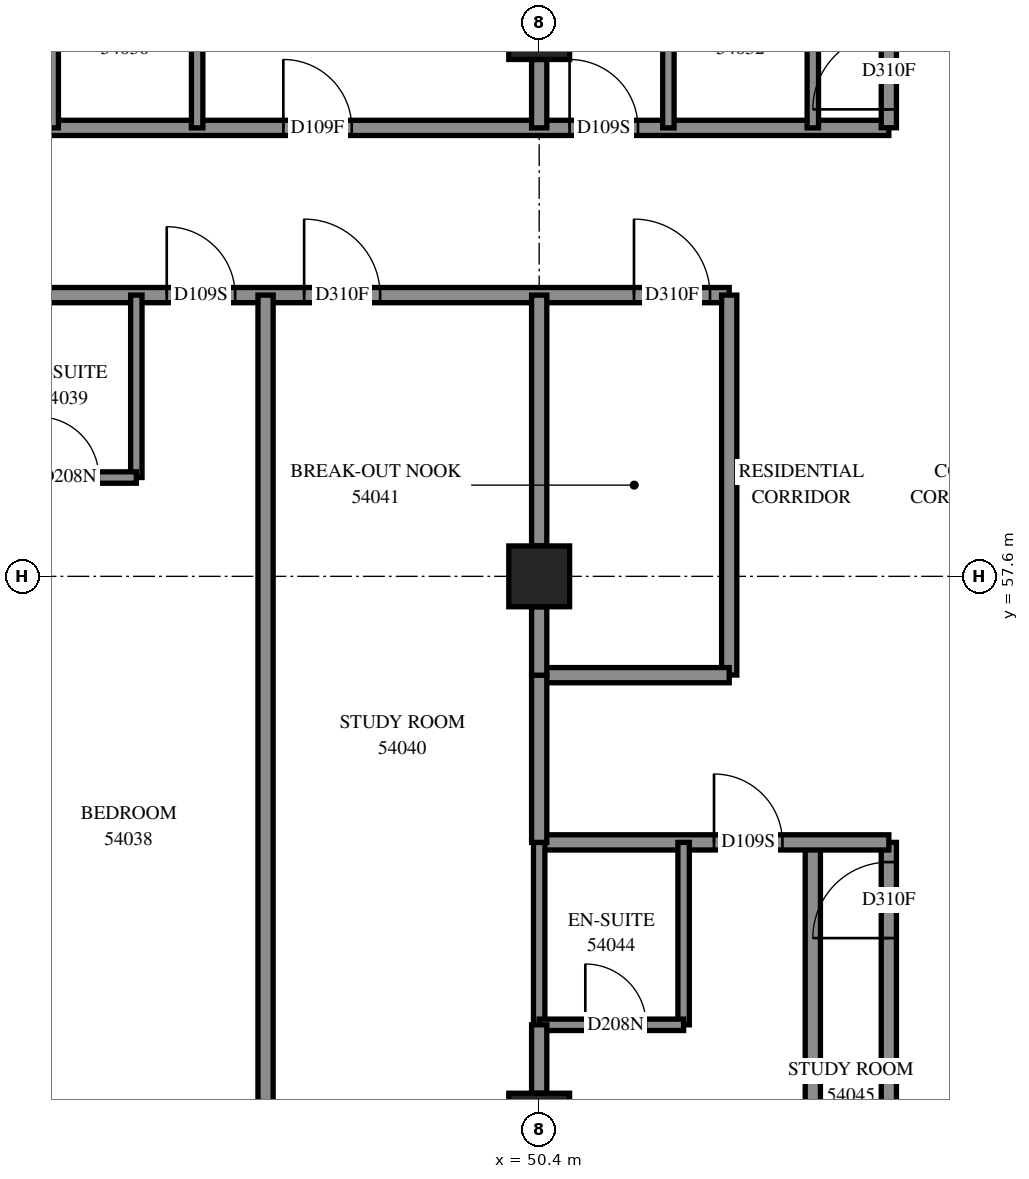
"""IFC4 building model, lengths in metres.
Left out: names, types, materials, properties, quantities, classifications, styles, units other than length and angle.
Written with IfcOpenShell. Run it as: python <this file> out.ifc"""

import sys

from ifc_helpers import new_model, si_unit, direction, frame, frame_2d, origin, origin_2d, place, context, subcontext, project, spatial, rectangle, extrude, element, fill, save


model = new_model("IFC4")
c1 = context("Model", 3, precision=1e-05, world=origin(), true_north=direction((0.0, 1.0)))
c2 = subcontext(c1, "Body", "Model", "MODEL_VIEW")
j1 = project(units=[si_unit("LENGTHUNIT", "METRE"), si_unit("PLANEANGLEUNIT", "RADIAN")], contexts=[c1])
p1 = place(None, origin())
s1 = spatial("IfcSite", under=j1, at=p1, CompositionType="ELEMENT")
p2 = place(p1, origin())
s2 = spatial("IfcBuilding", under=s1, at=p2, CompositionType="ELEMENT")
p3 = place(p2, frame((0.0, 0.0, 199.8)))
s3 = spatial("IfcBuildingStorey", under=s2, at=p3, CompositionType="ELEMENT", Elevation=199.8)
for number, where, z_axis, x_axis in (
    (1, (50.4, 50.4, 0.0), (0.0, 0.0, 1.0), (1.0, 0.0, 0.0)),
    (2, (50.4, 57.6, 0.0), (0.0, 0.0, 1.0), (1.0, 0.0, 0.0)),
    (3, (50.4, 64.8, 0.0), (0.0, 0.0, 1.0), (1.0, 0.0, 0.0)),
):
    element("IfcColumn", number, at=place(p3, frame(where, z_axis=z_axis, x_axis=x_axis)), inside=s3, PredefinedType="COLUMN", context=c2, shape_type="SweptSolid", body=[
        extrude(rectangle(XDim=0.8, YDim=0.8, at=origin_2d()), origin(), (0.0, 0.0, 1.0), 3.1),
    ])
p4 = place(p3, frame((36.0, 61.3, 0.0), z_axis=(0.0, 0.0, 1.0), x_axis=(1.0, 0.0, 0.0)))
e4 = element("IfcWall", 4, at=p4, inside=s3, PredefinedType="PARTITIONING", context=c2, shape_type="SweptSolid", body=[
    extrude(rectangle(XDim=16.9, YDim=0.2, at=frame_2d((8.45, 0.0))), origin(), (0.0, 0.0, 1.0), 3.1),
])
p5 = place(p4, frame((2.3, 0.0, 0.0)))
e5 = element("IfcOpeningElement", 5, at=p5, cuts=e4, PredefinedType="OPENING", context=c2, shape_type="SweptSolid", body=[
    extrude(rectangle(XDim=0.9, YDim=2.1, at=frame_2d((0.45, 1.05))), frame((0.0, 0.11, 0.0), z_axis=(0.0, -1.0, 0.0), x_axis=(1.0, 0.0, 0.0)), (0.0, 0.0, 1.0), 0.22),
])
p6 = place(p4, frame((4.107, 0.0, 0.0)))
e6 = element("IfcOpeningElement", 6, at=p6, cuts=e4, PredefinedType="OPENING", context=c2, shape_type="SweptSolid", body=[
    extrude(rectangle(XDim=1.0, YDim=2.1, at=frame_2d((0.5, 1.05))), frame((0.0, 0.11, 0.0), z_axis=(0.0, -1.0, 0.0), x_axis=(1.0, 0.0, 0.0)), (0.0, 0.0, 1.0), 0.22),
])
p7 = place(p4, frame((9.5, 0.0, 0.0)))
e7 = element("IfcOpeningElement", 7, at=p7, cuts=e4, PredefinedType="OPENING", context=c2, shape_type="SweptSolid", body=[
    extrude(rectangle(XDim=0.9, YDim=2.1, at=frame_2d((0.45, 1.05))), frame((0.0, 0.11, 0.0), z_axis=(0.0, -1.0, 0.0), x_axis=(1.0, 0.0, 0.0)), (0.0, 0.0, 1.0), 0.22),
])
p8 = place(p4, frame((11.307, 0.0, 0.0)))
e8 = element("IfcOpeningElement", 8, at=p8, cuts=e4, PredefinedType="OPENING", context=c2, shape_type="SweptSolid", body=[
    extrude(rectangle(XDim=1.0, YDim=2.1, at=frame_2d((0.5, 1.05))), frame((0.0, 0.11, 0.0), z_axis=(0.0, -1.0, 0.0), x_axis=(1.0, 0.0, 0.0)), (0.0, 0.0, 1.0), 0.22),
])
p9 = place(p4, frame((15.647, 0.0, 0.0)))
e9 = element("IfcOpeningElement", 9, at=p9, cuts=e4, PredefinedType="OPENING", context=c2, shape_type="SweptSolid", body=[
    extrude(rectangle(XDim=1.0, YDim=2.1, at=frame_2d((0.5, 1.05))), frame((0.0, 0.11, 0.0), z_axis=(0.0, -1.0, 0.0), x_axis=(1.0, 0.0, 0.0)), (0.0, 0.0, 1.0), 0.22),
])
p10 = place(p3, frame((40.702, 63.5, 0.0), z_axis=(0.0, 0.0, 1.0), x_axis=(1.0, 0.0, 0.0)))
e10 = element("IfcWall", 10, at=p10, inside=s3, PredefinedType="PARTITIONING", context=c2, shape_type="SweptSolid", body=[
    extrude(rectangle(XDim=14.298, YDim=0.2, at=frame_2d((7.149, 0.0))), origin(), (0.0, 0.0, 1.0), 3.1),
])
p11 = place(p10, frame((6.332, 0.0, 0.0)))
e11 = element("IfcOpeningElement", 11, at=p11, cuts=e10, PredefinedType="OPENING", context=c2, shape_type="SweptSolid", body=[
    extrude(rectangle(XDim=0.9, YDim=2.1, at=frame_2d((0.45, 1.05))), frame((0.0, 0.11, 0.0), z_axis=(0.0, -1.0, 0.0), x_axis=(1.0, 0.0, 0.0)), (0.0, 0.0, 1.0), 0.22),
])
p12 = place(p10, frame((10.098, 0.0, 0.0)))
e12 = element("IfcOpeningElement", 12, at=p12, cuts=e10, PredefinedType="OPENING", context=c2, shape_type="SweptSolid", body=[
    extrude(rectangle(XDim=0.9, YDim=2.1, at=frame_2d((0.45, 1.05))), frame((0.0, 0.11, 0.0), z_axis=(0.0, -1.0, 0.0), x_axis=(1.0, 0.0, 0.0)), (0.0, 0.0, 1.0), 0.22),
])
p13 = place(p3, frame((54.0, 42.372, 0.0), z_axis=(0.0, 0.0, 1.0), x_axis=(0.0, 1.0, 0.0)))
e13 = element("IfcWall", 13, at=p13, inside=s3, PredefinedType="PARTITIONING", context=c2, shape_type="SweptSolid", body=[
    extrude(rectangle(XDim=11.728, YDim=0.2, at=frame_2d((5.864, 0.0))), origin(), (0.0, 0.0, 1.0), 3.1),
])
p14 = place(p3, frame((46.8, 49.7, 0.0), z_axis=(0.0, 0.0, 1.0), x_axis=(0.0, 1.0, 0.0)))
e14 = element("IfcWall", 14, at=p14, inside=s3, PredefinedType="PARTITIONING", context=c2, shape_type="SweptSolid", body=[
    extrude(rectangle(XDim=11.6, YDim=0.2, at=frame_2d((5.8, 0.0))), origin(), (0.0, 0.0, 1.0), 3.1),
])
p15 = place(p3, frame((55.0, 47.8, 0.0), z_axis=(0.0, 0.0, 1.0), x_axis=(0.0, 1.0, 0.0)))
e15 = element("IfcWall", 15, at=p15, inside=s3, PredefinedType="PARTITIONING", context=c2, shape_type="SweptSolid", body=[
    extrude(rectangle(XDim=6.3, YDim=0.2, at=frame_2d((3.15, 0.0))), origin(), (0.0, 0.0, 1.0), 3.1),
])
p16 = place(p15, frame((5.041, 0.0, 0.0)))
e16 = element("IfcOpeningElement", 16, at=p16, cuts=e15, PredefinedType="OPENING", context=c2, shape_type="SweptSolid", body=[
    extrude(rectangle(XDim=1.0, YDim=2.1, at=frame_2d((0.5, 1.05))), frame((0.0, 0.11, 0.0), z_axis=(0.0, -1.0, 0.0), x_axis=(1.0, 0.0, 0.0)), (0.0, 0.0, 1.0), 0.22),
])
p17 = place(p3, frame((52.9, 56.302, 0.0), z_axis=(0.0, 0.0, 1.0), x_axis=(0.0, 1.0, 0.0)))
e17 = element("IfcWall", 17, at=p17, inside=s3, PredefinedType="PARTITIONING", context=c2, shape_type="SweptSolid", body=[
    extrude(rectangle(XDim=4.998, YDim=0.2, at=frame_2d((2.499, 0.0))), origin(), (0.0, 0.0, 1.0), 3.1),
])
p18 = place(p3, frame((50.4, 54.1, 0.0), z_axis=(0.0, 0.0, 1.0), x_axis=(1.0, 0.0, 0.0)))
e18 = element("IfcWall", 18, at=p18, inside=s3, PredefinedType="PARTITIONING", context=c2, shape_type="SweptSolid", body=[
    extrude(rectangle(XDim=4.6, YDim=0.2, at=frame_2d((2.3, 0.0))), origin(), (0.0, 0.0, 1.0), 3.1),
])
p19 = place(p18, frame((2.3, 0.0, 0.0)))
e19 = element("IfcOpeningElement", 19, at=p19, cuts=e18, PredefinedType="OPENING", context=c2, shape_type="SweptSolid", body=[
    extrude(rectangle(XDim=0.9, YDim=2.1, at=frame_2d((0.45, 1.05))), frame((0.0, 0.11, 0.0), z_axis=(0.0, -1.0, 0.0), x_axis=(1.0, 0.0, 0.0)), (0.0, 0.0, 1.0), 0.22),
])
p20 = place(p3, frame((55.0, 63.502, 0.0), z_axis=(0.0, 0.0, 1.0), x_axis=(0.0, 1.0, 0.0)))
e20 = element("IfcWall", 20, at=p20, inside=s3, PredefinedType="PARTITIONING", context=c2, shape_type="SweptSolid", body=[
    extrude(rectangle(XDim=3.898, YDim=0.2, at=frame_2d((1.949, 0.0))), origin(), (0.0, 0.0, 1.0), 3.1),
])
p21 = place(p20, frame((0.242, 0.0, 0.0)))
e21 = element("IfcOpeningElement", 21, at=p21, cuts=e20, PredefinedType="OPENING", context=c2, shape_type="SweptSolid", body=[
    extrude(rectangle(XDim=1.0, YDim=2.1, at=frame_2d((0.5, 1.05))), frame((0.0, 0.11, 0.0), z_axis=(0.0, -1.0, 0.0), x_axis=(1.0, 0.0, 0.0)), (0.0, 0.0, 1.0), 0.22),
])
p22 = place(p3, frame((50.4, 58.0, 0.0), z_axis=(0.0, 0.0, 1.0), x_axis=(0.0, 1.0, 0.0)))
e22 = element("IfcWall", 22, at=p22, inside=s3, PredefinedType="PARTITIONING", context=c2, shape_type="SweptSolid", body=[
    extrude(rectangle(XDim=3.3, YDim=0.2, at=frame_2d((1.65, 0.0))), origin(), (0.0, 0.0, 1.0), 3.1),
])
p23 = place(p3, frame((50.4, 56.3, 0.0), z_axis=(0.0, 0.0, 1.0), x_axis=(1.0, 0.0, 0.0)))
e23 = element("IfcWall", 23, at=p23, inside=s3, PredefinedType="PARTITIONING", context=c2, shape_type="SweptSolid", body=[
    extrude(rectangle(XDim=2.5, YDim=0.2, at=frame_2d((1.25, 0.0))), origin(), (0.0, 0.0, 1.0), 3.1),
])
for number, where, z_axis, x_axis in (
    (24, (44.0, 63.5, 0.0), (0.0, 0.0, 1.0), (0.0, 1.0, 0.0)),
    (25, (45.9, 63.5, 0.0), (0.0, 0.0, 1.0), (0.0, 1.0, 0.0)),
    (26, (52.1, 63.5, 0.0), (0.0, 0.0, 1.0), (0.0, 1.0, 0.0)),
    (27, (54.0, 63.5, 0.0), (0.0, 0.0, 1.0), (0.0, 1.0, 0.0)),
    (28, (45.1, 58.9, 0.0), (0.0, 0.0, 1.0), (0.0, 1.0, 0.0)),
    (29, (52.3, 51.7, 0.0), (0.0, 0.0, 1.0), (0.0, 1.0, 0.0)),
    (30, (50.4, 51.7, 0.0), (0.0, 0.0, 1.0), (0.0, 1.0, 0.0)),
):
    element("IfcWall", number, at=place(p3, frame(where, z_axis=z_axis, x_axis=x_axis)), inside=s3, PredefinedType="PARTITIONING", context=c2, shape_type="SweptSolid", body=[
        extrude(rectangle(XDim=2.4, YDim=0.15, at=frame_2d((1.2, 0.0))), origin(), (0.0, 0.0, 1.0), 3.1),
    ])
p24 = place(p3, frame((50.4, 54.1, 0.0), z_axis=(0.0, 0.0, 1.0), x_axis=(0.0, 1.0, 0.0)))
e31 = element("IfcWall", 31, at=p24, inside=s3, PredefinedType="PARTITIONING", context=c2, shape_type="SweptSolid", body=[
    extrude(rectangle(XDim=2.2, YDim=0.2, at=frame_2d((1.1, 0.0))), origin(), (0.0, 0.0, 1.0), 3.1),
])
p25 = place(p3, frame((43.2, 58.9, 0.0), z_axis=(0.0, 0.0, 1.0), x_axis=(1.0, 0.0, 0.0)))
e32 = element("IfcWall", 32, at=p25, inside=s3, PredefinedType="PARTITIONING", context=c2, shape_type="SweptSolid", body=[
    extrude(rectangle(XDim=1.9, YDim=0.15, at=frame_2d((0.95, 0.0))), origin(), (0.0, 0.0, 1.0), 3.1),
])
p26 = place(p25, frame((0.607, 0.0, 0.0)))
e33 = element("IfcOpeningElement", 33, at=p26, cuts=e32, PredefinedType="OPENING", context=c2, shape_type="SweptSolid", body=[
    extrude(rectangle(XDim=0.8, YDim=2.1, at=frame_2d((0.4, 1.05))), frame((0.0, 0.085, 0.0), z_axis=(0.0, -1.0, 0.0), x_axis=(1.0, 0.0, 0.0)), (0.0, 0.0, 1.0), 0.17),
])
p27 = place(p3, frame((50.4, 51.7, 0.0), z_axis=(0.0, 0.0, 1.0), x_axis=(1.0, 0.0, 0.0)))
e34 = element("IfcWall", 34, at=p27, inside=s3, PredefinedType="PARTITIONING", context=c2, shape_type="SweptSolid", body=[
    extrude(rectangle(XDim=1.9, YDim=0.15, at=frame_2d((0.95, 0.0))), origin(), (0.0, 0.0, 1.0), 3.1),
])
p28 = place(p27, frame((0.607, 0.0, 0.0)))
e35 = element("IfcOpeningElement", 35, at=p28, cuts=e34, PredefinedType="OPENING", context=c2, shape_type="SweptSolid", body=[
    extrude(rectangle(XDim=0.8, YDim=2.1, at=frame_2d((0.4, 1.05))), frame((0.0, 0.085, 0.0), z_axis=(0.0, -1.0, 0.0), x_axis=(1.0, 0.0, 0.0)), (0.0, 0.0, 1.0), 0.17),
])
for number, where, z_axis, x_axis in (
    (36, (50.4, 50.8, 0.0), (0.0, 0.0, 1.0), (0.0, 1.0, 0.0)),
    (37, (50.4, 56.3, 0.0), (0.0, 0.0, 1.0), (0.0, 1.0, 0.0)),
    (38, (50.4, 63.5, 0.0), (0.0, 0.0, 1.0), (0.0, 1.0, 0.0)),
):
    element("IfcWall", number, at=place(p3, frame(where, z_axis=z_axis, x_axis=x_axis)), inside=s3, PredefinedType="PARTITIONING", context=c2, shape_type="SweptSolid", body=[
        extrude(rectangle(XDim=0.9, YDim=0.2, at=frame_2d((0.45, 0.0))), origin(), (0.0, 0.0, 1.0), 3.1),
    ])
p29 = place(p11, origin())
e39 = element("IfcDoor", 39, at=p29, inside=s3, OperationType="SINGLE_SWING_RIGHT", PredefinedType="DOOR", context=c2, shape_type="SweptSolid", body=[
    extrude(rectangle(XDim=0.9, YDim=2.1, at=frame_2d((0.45, 1.05))), frame((0.0, 0.025, 0.0), z_axis=(0.0, -1.0, 0.0), x_axis=(1.0, 0.0, 0.0)), (0.0, 0.0, 1.0), 0.05),
])
fill(e11, e39)
p30 = place(p12, origin())
e40 = element("IfcDoor", 40, at=p30, inside=s3, OperationType="SINGLE_SWING_RIGHT", PredefinedType="DOOR", context=c2, shape_type="SweptSolid", body=[
    extrude(rectangle(XDim=0.9, YDim=2.1, at=frame_2d((0.45, 1.05))), frame((0.0, 0.025, 0.0), z_axis=(0.0, -1.0, 0.0), x_axis=(1.0, 0.0, 0.0)), (0.0, 0.0, 1.0), 0.05),
])
fill(e12, e40)
p31 = place(p21, origin())
e41 = element("IfcDoor", 41, at=p31, inside=s3, OperationType="SINGLE_SWING_LEFT", PredefinedType="DOOR", context=c2, shape_type="SweptSolid", body=[
    extrude(rectangle(XDim=1.0, YDim=2.1, at=frame_2d((0.5, 1.05))), frame((0.0, 0.025, 0.0), z_axis=(0.0, -1.0, 0.0), x_axis=(1.0, 0.0, 0.0)), (0.0, 0.0, 1.0), 0.05),
])
fill(e21, e41)
p32 = place(p7, origin())
e42 = element("IfcDoor", 42, at=p32, inside=s3, OperationType="SINGLE_SWING_LEFT", PredefinedType="DOOR", context=c2, shape_type="SweptSolid", body=[
    extrude(rectangle(XDim=0.9, YDim=2.1, at=frame_2d((0.45, 1.05))), frame((0.0, 0.025, 0.0), z_axis=(0.0, -1.0, 0.0), x_axis=(1.0, 0.0, 0.0)), (0.0, 0.0, 1.0), 0.05),
])
fill(e7, e42)
p33 = place(p26, origin())
e43 = element("IfcDoor", 43, at=p33, inside=s3, OperationType="SINGLE_SWING_RIGHT", PredefinedType="DOOR", context=c2, shape_type="SweptSolid", body=[
    extrude(rectangle(XDim=0.8, YDim=2.1, at=frame_2d((0.4, 1.05))), frame((0.0, 0.025, 0.0), z_axis=(0.0, -1.0, 0.0), x_axis=(1.0, 0.0, 0.0)), (0.0, 0.0, 1.0), 0.05),
])
fill(e33, e43)
p34 = place(p8, origin())
e44 = element("IfcDoor", 44, at=p34, inside=s3, OperationType="SINGLE_SWING_RIGHT", PredefinedType="DOOR", context=c2, shape_type="SweptSolid", body=[
    extrude(rectangle(XDim=1.0, YDim=2.1, at=frame_2d((0.5, 1.05))), frame((0.0, 0.025, 0.0), z_axis=(0.0, -1.0, 0.0), x_axis=(1.0, 0.0, 0.0)), (0.0, 0.0, 1.0), 0.05),
])
fill(e8, e44)
p35 = place(p9, origin())
e45 = element("IfcDoor", 45, at=p35, inside=s3, OperationType="SINGLE_SWING_LEFT", PredefinedType="DOOR", context=c2, shape_type="SweptSolid", body=[
    extrude(rectangle(XDim=1.0, YDim=2.1, at=frame_2d((0.5, 1.05))), frame((0.0, 0.025, 0.0), z_axis=(0.0, -1.0, 0.0), x_axis=(1.0, 0.0, 0.0)), (0.0, 0.0, 1.0), 0.05),
])
fill(e9, e45)
p36 = place(p19, origin())
e46 = element("IfcDoor", 46, at=p36, inside=s3, OperationType="SINGLE_SWING_LEFT", PredefinedType="DOOR", context=c2, shape_type="SweptSolid", body=[
    extrude(rectangle(XDim=0.9, YDim=2.1, at=frame_2d((0.45, 1.05))), frame((0.0, 0.025, 0.0), z_axis=(0.0, -1.0, 0.0), x_axis=(1.0, 0.0, 0.0)), (0.0, 0.0, 1.0), 0.05),
])
fill(e19, e46)
p37 = place(p28, origin())
e47 = element("IfcDoor", 47, at=p37, inside=s3, OperationType="SINGLE_SWING_RIGHT", PredefinedType="DOOR", context=c2, shape_type="SweptSolid", body=[
    extrude(rectangle(XDim=0.8, YDim=2.1, at=frame_2d((0.4, 1.05))), frame((0.0, 0.025, 0.0), z_axis=(0.0, -1.0, 0.0), x_axis=(1.0, 0.0, 0.0)), (0.0, 0.0, 1.0), 0.05),
])
fill(e35, e47)
p38 = place(p16, origin())
e48 = element("IfcDoor", 48, at=p38, inside=s3, OperationType="SINGLE_SWING_RIGHT", PredefinedType="DOOR", context=c2, shape_type="SweptSolid", body=[
    extrude(rectangle(XDim=1.0, YDim=2.1, at=frame_2d((0.5, 1.05))), frame((0.0, 0.025, 0.0), z_axis=(0.0, -1.0, 0.0), x_axis=(1.0, 0.0, 0.0)), (0.0, 0.0, 1.0), 0.05),
])
fill(e16, e48)
save(model, sys.argv[1])
